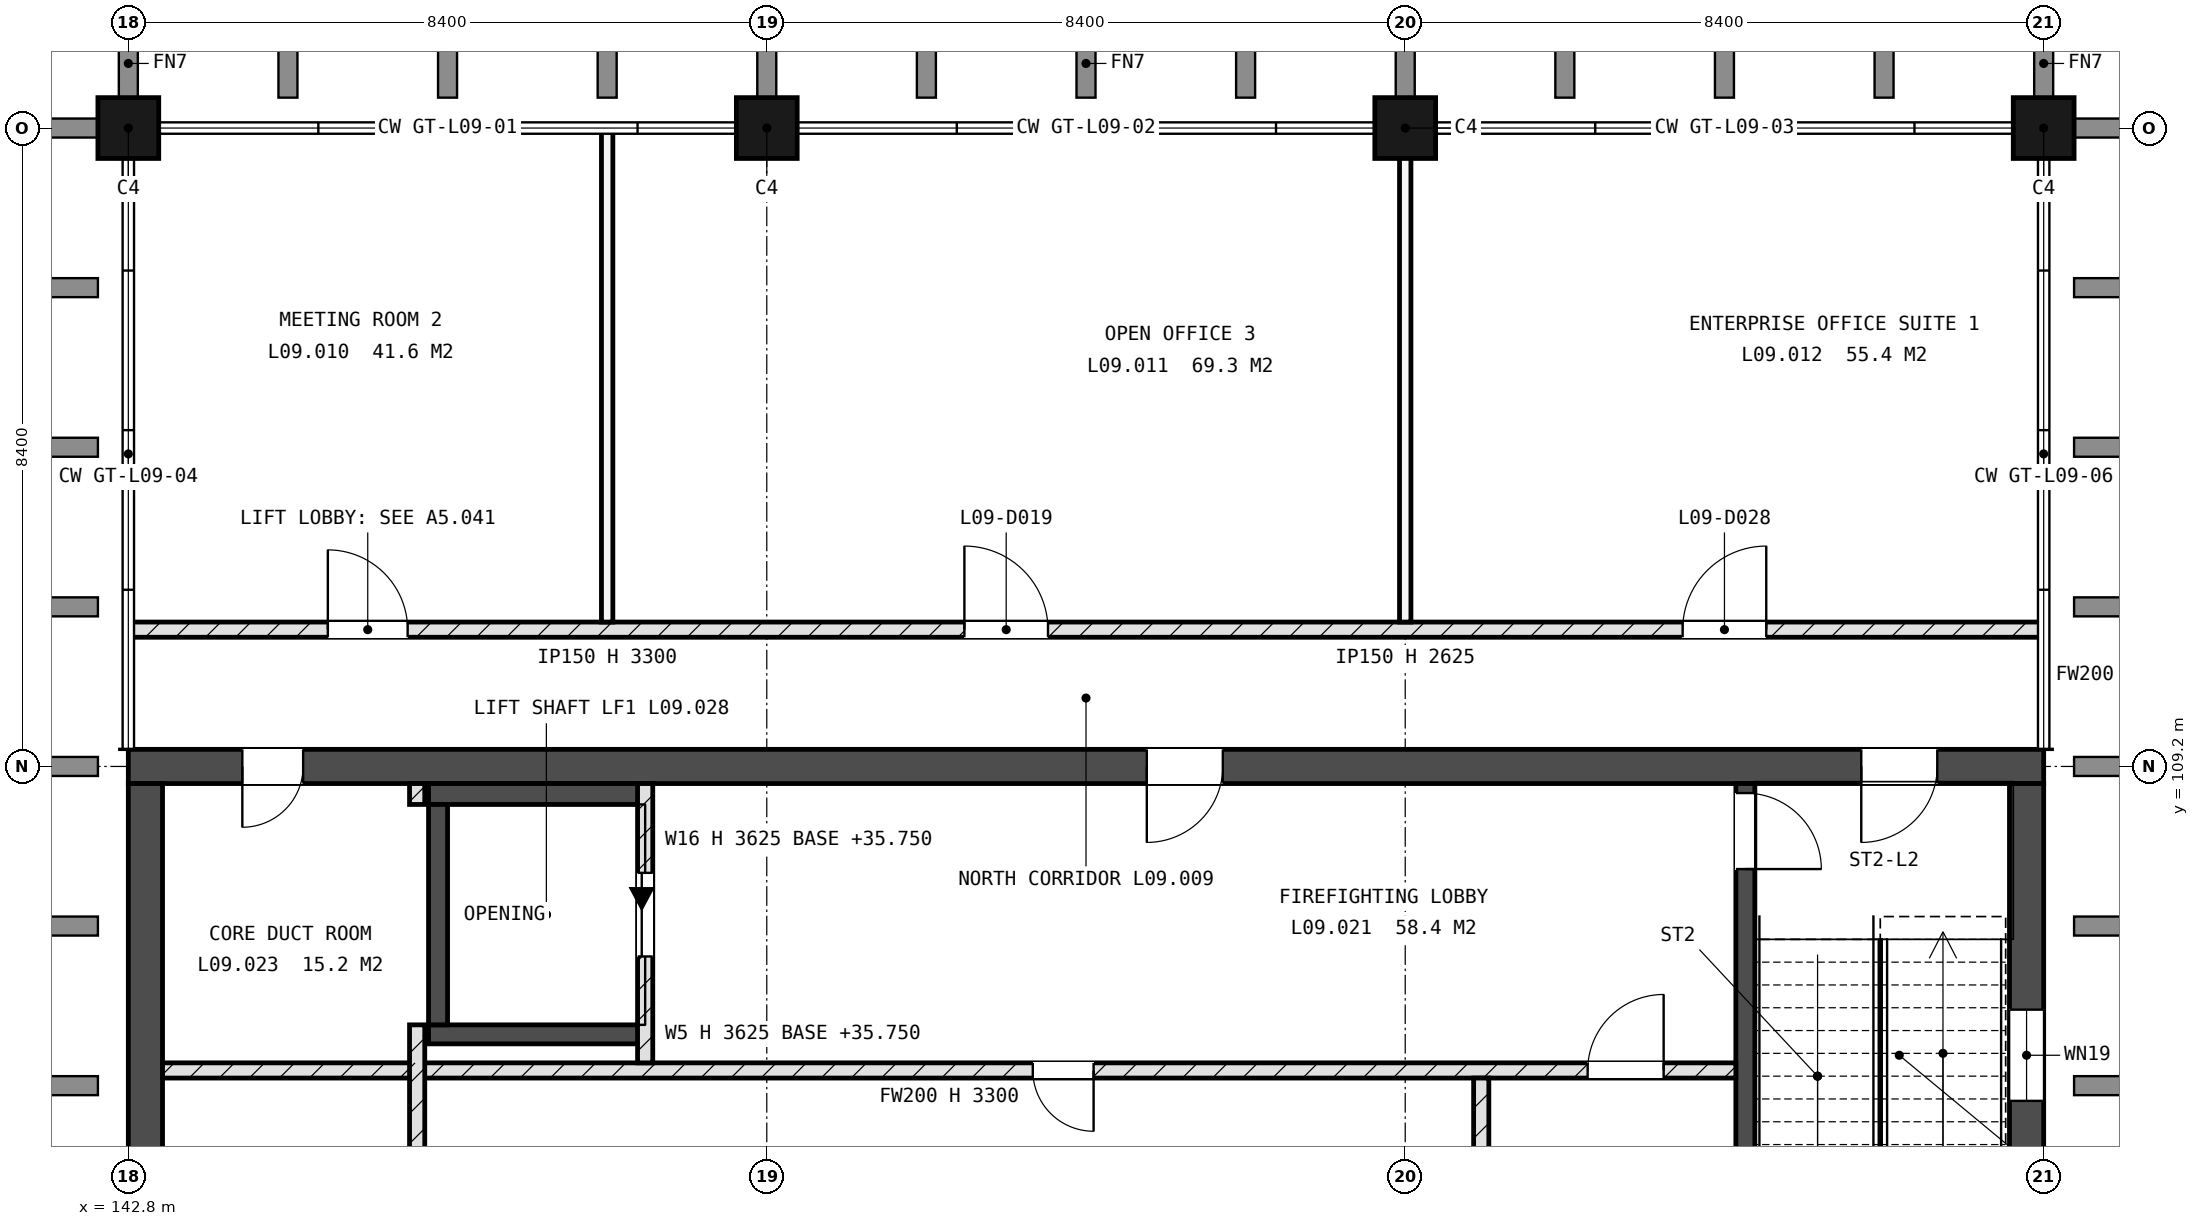
"""IFC4 building model, lengths in metres.
Left out: names, types, materials, properties, quantities, classifications, styles, units other than length and angle.
Written with IfcOpenShell. Run it as: python <this file> out.ifc"""

import sys

from ifc_helpers import new_model, si_unit, direction, frame, frame_2d, origin, origin_2d, place, context, subcontext, project, spatial, rectangle, extrude, element, fill, save


model = new_model("IFC4")
c1 = context("Model", 3, precision=1e-05, world=origin(), true_north=direction((0.0, 1.0)))
c2 = subcontext(c1, "Body", "Model", "MODEL_VIEW")
j1 = project(units=[si_unit("LENGTHUNIT", "METRE"), si_unit("PLANEANGLEUNIT", "RADIAN")], contexts=[c1])
p1 = place(None, origin())
s1 = spatial("IfcSite", under=j1, at=p1, CompositionType="ELEMENT")
p2 = place(p1, origin())
s2 = spatial("IfcBuilding", under=s1, at=p2, CompositionType="ELEMENT")
p3 = place(p2, frame((0.0, 0.0, 36.0)))
s3 = spatial("IfcBuildingStorey", under=s2, at=p3, CompositionType="ELEMENT", Elevation=36.0)
for number, where, z_axis, x_axis in (
    (1, (142.8, 117.6, -0.25), (0.0, 0.0, 1.0), (1.0, 0.0, 0.0)),
    (2, (151.2, 117.6, -0.25), (0.0, 0.0, 1.0), (1.0, 0.0, 0.0)),
    (3, (159.6, 117.6, -0.25), (0.0, 0.0, 1.0), (1.0, 0.0, 0.0)),
    (4, (168.0, 117.6, -0.25), (0.0, 0.0, 1.0), (1.0, 0.0, 0.0)),
):
    element("IfcColumn", number, at=place(p3, frame(where, z_axis=z_axis, x_axis=x_axis)), inside=s3, PredefinedType="COLUMN", context=c2, shape_type="SweptSolid", body=[
        extrude(rectangle(XDim=0.8, YDim=0.8, at=origin_2d()), origin(), (0.0, 0.0, 1.0), 3.625),
    ])
p4 = place(p3, frame((142.8, 109.2, -0.25), z_axis=(0.0, 0.0, 1.0), x_axis=(1.0, 0.0, 0.0)))
e5 = element("IfcWall", 5, at=p4, inside=s3, PredefinedType="SHEAR", context=c2, shape_type="SweptSolid", body=[
    extrude(rectangle(XDim=25.2, YDim=0.45, at=frame_2d((12.6, 0.0))), origin(), (0.0, 0.0, 1.0), 3.625),
])
p5 = place(p4, frame((22.8, 0.0, 0.25)))
e6 = element("IfcOpeningElement", 6, at=p5, cuts=e5, PredefinedType="OPENING", context=c2, shape_type="SweptSolid", body=[
    extrude(rectangle(XDim=1.0, YDim=2.1, at=frame_2d((0.5, 1.05))), frame((0.0, 0.235, 0.0), z_axis=(0.0, -1.0, 0.0), x_axis=(1.0, 0.0, 0.0)), (0.0, 0.0, 1.0), 0.47),
])
p6 = place(p4, frame((1.5, 0.0, 0.25)))
e7 = element("IfcOpeningElement", 7, at=p6, cuts=e5, PredefinedType="OPENING", context=c2, shape_type="SweptSolid", body=[
    extrude(rectangle(XDim=0.8, YDim=2.1, at=frame_2d((0.4, 1.05))), frame((0.0, 0.235, 0.0), z_axis=(0.0, -1.0, 0.0), x_axis=(1.0, 0.0, 0.0)), (0.0, 0.0, 1.0), 0.47),
])
p7 = place(p4, frame((13.4, 0.0, 0.25)))
e8 = element("IfcOpeningElement", 8, at=p7, cuts=e5, PredefinedType="OPENING", context=c2, shape_type="SweptSolid", body=[
    extrude(rectangle(XDim=1.0, YDim=2.1, at=frame_2d((0.5, 1.05))), frame((0.0, 0.235, 0.0), z_axis=(0.0, -1.0, 0.0), x_axis=(1.0, 0.0, 0.0)), (0.0, 0.0, 1.0), 0.47),
])
p8 = place(p3, frame((143.025, 92.625, -0.25), z_axis=(0.0, 0.0, 1.0), x_axis=(0.0, 1.0, 0.0)))
e9 = element("IfcWall", 9, at=p8, inside=s3, PredefinedType="SHEAR", context=c2, shape_type="SweptSolid", body=[
    extrude(rectangle(XDim=16.35, YDim=0.45, at=frame_2d((8.175, 0.0))), origin(), (0.0, 0.0, 1.0), 3.625),
])
p9 = place(p8, frame((2.975, 0.0, 1.85)))
e10 = element("IfcOpeningElement", 10, at=p9, cuts=e9, PredefinedType="OPENING", context=c2, shape_type="SweptSolid", body=[
    extrude(rectangle(XDim=1.2, YDim=0.9, at=frame_2d((0.6, 0.45))), frame((0.0, 0.235, 0.0), z_axis=(0.0, -1.0, 0.0), x_axis=(1.0, 0.0, 0.0)), (0.0, 0.0, 1.0), 0.47),
])
p10 = place(p3, frame((167.775, 92.625, -0.25), z_axis=(0.0, 0.0, 1.0), x_axis=(0.0, 1.0, 0.0)))
e11 = element("IfcWall", 11, at=p10, inside=s3, PredefinedType="SHEAR", context=c2, shape_type="SweptSolid", body=[
    extrude(rectangle(XDim=16.35, YDim=0.45, at=frame_2d((8.175, 0.0))), origin(), (0.0, 0.0, 1.0), 3.625),
])
p11 = place(p10, frame((12.175, 0.0, 1.85)))
e12 = element("IfcOpeningElement", 12, at=p11, cuts=e11, PredefinedType="OPENING", context=c2, shape_type="SweptSolid", body=[
    extrude(rectangle(XDim=1.2, YDim=0.9, at=frame_2d((0.6, 0.45))), frame((0.0, 0.235, 0.0), z_axis=(0.0, -1.0, 0.0), x_axis=(1.0, 0.0, 0.0)), (0.0, 0.0, 1.0), 0.47),
])
p12 = place(p3, frame((164.075, 101.35, -0.25), z_axis=(0.0, 0.0, 1.0), x_axis=(0.0, 1.0, 0.0)))
e13 = element("IfcWall", 13, at=p12, inside=s3, PredefinedType="SHEAR", context=c2, shape_type="SweptSolid", body=[
    extrude(rectangle(XDim=7.625, YDim=0.25, at=frame_2d((3.812, 0.0))), origin(), (0.0, 0.0, 1.0), 3.625),
])
p13 = place(p12, frame((6.5, 0.0, 0.25)))
e14 = element("IfcOpeningElement", 14, at=p13, cuts=e13, PredefinedType="OPENING", context=c2, shape_type="SweptSolid", body=[
    extrude(rectangle(XDim=1.0, YDim=2.1, at=frame_2d((0.5, 1.05))), frame((0.0, 0.135, 0.0), z_axis=(0.0, -1.0, 0.0), x_axis=(1.0, 0.0, 0.0)), (0.0, 0.0, 1.0), 0.27),
])
p14 = place(p3, frame((146.75, 105.675, -0.25), z_axis=(0.0, 0.0, 1.0), x_axis=(1.0, 0.0, 0.0)))
e15 = element("IfcWall", 15, at=p14, inside=s3, PredefinedType="SHEAR", context=c2, shape_type="SweptSolid", body=[
    extrude(rectangle(XDim=2.85, YDim=0.25, at=frame_2d((1.425, 0.0))), origin(), (0.0, 0.0, 1.0), 3.625),
])
p15 = place(p3, frame((146.75, 108.837, -0.25), z_axis=(0.0, 0.0, 1.0), x_axis=(1.0, 0.0, 0.0)))
e16 = element("IfcWall", 16, at=p15, inside=s3, PredefinedType="SHEAR", context=c2, shape_type="SweptSolid", body=[
    extrude(rectangle(XDim=2.85, YDim=0.275, at=frame_2d((1.425, 0.0))), origin(), (0.0, 0.0, 1.0), 3.625),
])
p16 = place(p3, frame((146.875, 105.8, -0.25), z_axis=(0.0, 0.0, 1.0), x_axis=(0.0, 1.0, 0.0)))
e17 = element("IfcWall", 17, at=p16, inside=s3, PredefinedType="SHEAR", context=c2, shape_type="SweptSolid", body=[
    extrude(rectangle(XDim=2.9, YDim=0.25, at=frame_2d((1.45, 0.0))), origin(), (0.0, 0.0, 1.0), 3.625),
])
p17 = place(p3, frame((143.25, 105.2, 0.0), z_axis=(0.0, 0.0, 1.0), x_axis=(1.0, 0.0, 0.0)))
e18 = element("IfcWall", 18, at=p17, inside=s3, PredefinedType="SOLIDWALL", context=c2, shape_type="SweptSolid", body=[
    extrude(rectangle(XDim=20.7, YDim=0.2, at=frame_2d((10.35, 0.0))), origin(), (0.0, 0.0, 1.0), 3.3),
])
p18 = place(p17, frame((11.45, 0.0, 0.0)))
e19 = element("IfcOpeningElement", 19, at=p18, cuts=e18, PredefinedType="OPENING", context=c2, shape_type="SweptSolid", body=[
    extrude(rectangle(XDim=0.8, YDim=2.1, at=frame_2d((0.4, 1.05))), frame((0.0, 0.11, 0.0), z_axis=(0.0, -1.0, 0.0), x_axis=(1.0, 0.0, 0.0)), (0.0, 0.0, 1.0), 0.22),
])
p19 = place(p17, frame((18.75, 0.0, 0.0)))
e20 = element("IfcOpeningElement", 20, at=p19, cuts=e18, PredefinedType="OPENING", context=c2, shape_type="SweptSolid", body=[
    extrude(rectangle(XDim=1.0, YDim=2.1, at=frame_2d((0.5, 1.05))), frame((0.0, 0.11, 0.0), z_axis=(0.0, -1.0, 0.0), x_axis=(1.0, 0.0, 0.0)), (0.0, 0.0, 1.0), 0.22),
])
p20 = place(p3, frame((142.8, 111.0, 0.0), z_axis=(0.0, 0.0, 1.0), x_axis=(1.0, 0.0, 0.0)))
e21 = element("IfcWall", 21, at=p20, inside=s3, PredefinedType="SOLIDWALL", context=c2, shape_type="SweptSolid", body=[
    extrude(rectangle(XDim=25.2, YDim=0.2, at=frame_2d((12.6, 0.0))), origin(), (0.0, 0.0, 1.0), 3.3),
])
p21 = place(p20, frame((2.625, 0.0, 0.0)))
e22 = element("IfcOpeningElement", 22, at=p21, cuts=e21, PredefinedType="OPENING", context=c2, shape_type="SweptSolid", body=[
    extrude(rectangle(XDim=1.05, YDim=2.1, at=frame_2d((0.525, 1.05))), frame((0.0, 0.11, 0.0), z_axis=(0.0, -1.0, 0.0), x_axis=(1.0, 0.0, 0.0)), (0.0, 0.0, 1.0), 0.22),
])
p22 = place(p20, frame((11.0, 0.0, 0.0)))
e23 = element("IfcOpeningElement", 23, at=p22, cuts=e21, PredefinedType="OPENING", context=c2, shape_type="SweptSolid", body=[
    extrude(rectangle(XDim=1.1, YDim=2.25, at=frame_2d((0.55, 1.125))), frame((0.0, 0.11, 0.0), z_axis=(0.0, -1.0, 0.0), x_axis=(1.0, 0.0, 0.0)), (0.0, 0.0, 1.0), 0.22),
])
p23 = place(p20, frame((20.45, 0.0, 0.0)))
e24 = element("IfcOpeningElement", 24, at=p23, cuts=e21, PredefinedType="OPENING", context=c2, shape_type="SweptSolid", body=[
    extrude(rectangle(XDim=1.1, YDim=2.25, at=frame_2d((0.55, 1.125))), frame((0.0, 0.11, 0.0), z_axis=(0.0, -1.0, 0.0), x_axis=(1.0, 0.0, 0.0)), (0.0, 0.0, 1.0), 0.22),
])
p24 = place(p3, frame((146.6, 100.5, 0.0), z_axis=(0.0, 0.0, 1.0), x_axis=(0.0, 1.0, 0.0)))
e25 = element("IfcWall", 25, at=p24, inside=s3, PredefinedType="SOLIDWALL", context=c2, shape_type="SweptSolid", body=[
    extrude(rectangle(XDim=5.3, YDim=0.2, at=frame_2d((2.65, 0.0))), origin(), (0.0, 0.0, 1.0), 3.3),
])
p25 = place(p24, frame((1.8, 0.0, 0.0)))
e26 = element("IfcOpeningElement", 26, at=p25, cuts=e25, PredefinedType="OPENING", context=c2, shape_type="SweptSolid", body=[
    extrude(rectangle(XDim=1.0, YDim=2.1, at=frame_2d((0.5, 1.05))), frame((0.0, 0.11, 0.0), z_axis=(0.0, -1.0, 0.0), x_axis=(1.0, 0.0, 0.0)), (0.0, 0.0, 1.0), 0.22),
])
p26 = place(p3, frame((146.6, 108.7, 0.0), z_axis=(0.0, 0.0, 1.0), x_axis=(0.0, 1.0, 0.0)))
e27 = element("IfcWall", 27, at=p26, inside=s3, PredefinedType="SOLIDWALL", context=c2, shape_type="SweptSolid", body=[
    extrude(rectangle(XDim=0.275, YDim=0.2, at=frame_2d((0.138, 0.0))), origin(), (0.0, 0.0, 1.0), 3.3),
])
p27 = place(p3, frame((149.1, 111.1, 0.0), z_axis=(0.0, 0.0, 1.0), x_axis=(0.0, 1.0, 0.0)))
e28 = element("IfcWall", 28, at=p27, inside=s3, PredefinedType="PARTITIONING", context=c2, shape_type="SweptSolid", body=[
    extrude(rectangle(XDim=6.5, YDim=0.15, at=frame_2d((3.25, 0.0))), origin(), (0.0, 0.0, 1.0), 3.3),
])
p28 = place(p3, frame((149.6, 105.3, 0.0), z_axis=(0.0, 0.0, 1.0), x_axis=(0.0, 1.0, 0.0)))
e29 = element("IfcWall", 29, at=p28, inside=s3, PredefinedType="SOLIDWALL", context=c2, shape_type="SweptSolid", body=[
    extrude(rectangle(XDim=3.675, YDim=0.2, at=frame_2d((1.837, 0.0))), origin(), (0.0, 0.0, 1.0), 3.3),
])
p29 = place(p28, frame((1.4, 0.0, 0.0)))
e30 = element("IfcOpeningElement", 30, at=p29, cuts=e29, PredefinedType="OPENING", context=c2, shape_type="SweptSolid", body=[
    extrude(rectangle(XDim=1.1, YDim=2.1, at=frame_2d((0.55, 1.05))), frame((0.0, 0.11, 0.0), z_axis=(0.0, -1.0, 0.0), x_axis=(1.0, 0.0, 0.0)), (0.0, 0.0, 1.0), 0.22),
])
p30 = place(p3, frame((159.6, 111.1, 0.0), z_axis=(0.0, 0.0, 1.0), x_axis=(0.0, 1.0, 0.0)))
e31 = element("IfcWall", 31, at=p30, inside=s3, PredefinedType="PARTITIONING", context=c2, shape_type="SweptSolid", body=[
    extrude(rectangle(XDim=6.5, YDim=0.15, at=frame_2d((3.25, 0.0))), origin(), (0.0, 0.0, 1.0), 2.625),
])
p31 = place(p3, frame((160.6, 92.625, 0.0), z_axis=(0.0, 0.0, 1.0), x_axis=(0.0, 1.0, 0.0)))
e32 = element("IfcWall", 32, at=p31, inside=s3, PredefinedType="SOLIDWALL", context=c2, shape_type="SweptSolid", body=[
    extrude(rectangle(XDim=12.475, YDim=0.2, at=frame_2d((6.238, 0.0))), origin(), (0.0, 0.0, 1.0), 3.3),
])
p32 = place(p31, frame((5.075, 0.0, 0.0)))
e33 = element("IfcOpeningElement", 33, at=p32, cuts=e32, PredefinedType="OPENING", context=c2, shape_type="SweptSolid", body=[
    extrude(rectangle(XDim=0.8, YDim=2.1, at=frame_2d((0.4, 1.05))), frame((0.0, 0.11, 0.0), z_axis=(0.0, -1.0, 0.0), x_axis=(1.0, 0.0, 0.0)), (0.0, 0.0, 1.0), 0.22),
])
p33 = place(p31, frame((0.775, 0.0, 0.0)))
e34 = element("IfcOpeningElement", 34, at=p33, cuts=e32, PredefinedType="OPENING", context=c2, shape_type="SweptSolid", body=[
    extrude(rectangle(XDim=1.0, YDim=2.1, at=frame_2d((0.5, 1.05))), frame((0.0, 0.11, 0.0), z_axis=(0.0, -1.0, 0.0), x_axis=(1.0, 0.0, 0.0)), (0.0, 0.0, 1.0), 0.22),
])
p34 = place(p11, origin())
e35 = element("IfcWindow", 35, at=p34, inside=s3, PartitioningType="SINGLE_PANEL", PredefinedType="WINDOW", context=c2, shape_type="SweptSolid", body=[
    extrude(rectangle(XDim=1.2, YDim=0.9, at=frame_2d((0.6, 0.45))), frame((0.0, 0.03, 0.0), z_axis=(0.0, -1.0, 0.0), x_axis=(1.0, 0.0, 0.0)), (0.0, 0.0, 1.0), 0.06),
])
fill(e12, e35)
p35 = place(p29, origin())
e36 = element("IfcDoor", 36, at=p35, inside=s3, OperationType="SLIDING_TO_LEFT", PredefinedType="DOOR", context=c2, shape_type="SweptSolid", body=[
    extrude(rectangle(XDim=1.1, YDim=2.1, at=frame_2d((0.55, 1.05))), frame((0.0, 0.025, 0.0), z_axis=(0.0, -1.0, 0.0), x_axis=(1.0, 0.0, 0.0)), (0.0, 0.0, 1.0), 0.05),
])
fill(e30, e36)
p36 = place(p13, origin())
e37 = element("IfcDoor", 37, at=p36, inside=s3, OperationType="SINGLE_SWING_LEFT", PredefinedType="DOOR", context=c2, shape_type="SweptSolid", body=[
    extrude(rectangle(XDim=1.0, YDim=2.1, at=frame_2d((0.5, 1.05))), frame((0.0, 0.025, 0.0), z_axis=(0.0, -1.0, 0.0), x_axis=(1.0, 0.0, 0.0)), (0.0, 0.0, 1.0), 0.05),
])
fill(e14, e37)
p37 = place(p5, origin())
e38 = element("IfcDoor", 38, at=p37, inside=s3, OperationType="SINGLE_SWING_LEFT", PredefinedType="DOOR", context=c2, shape_type="SweptSolid", body=[
    extrude(rectangle(XDim=1.0, YDim=2.1, at=frame_2d((0.5, 1.05))), frame((0.0, 0.025, 0.0), z_axis=(0.0, -1.0, 0.0), x_axis=(1.0, 0.0, 0.0)), (0.0, 0.0, 1.0), 0.05),
])
fill(e6, e38)
p38 = place(p21, origin())
e39 = element("IfcDoor", 39, at=p38, inside=s3, OperationType="SINGLE_SWING_RIGHT", PredefinedType="DOOR", context=c2, shape_type="SweptSolid", body=[
    extrude(rectangle(XDim=1.05, YDim=2.1, at=frame_2d((0.525, 1.05))), frame((0.0, 0.025, 0.0), z_axis=(0.0, -1.0, 0.0), x_axis=(1.0, 0.0, 0.0)), (0.0, 0.0, 1.0), 0.05),
])
fill(e22, e39)
p39 = place(p22, origin())
e40 = element("IfcDoor", 40, at=p39, inside=s3, OperationType="SINGLE_SWING_RIGHT", PredefinedType="DOOR", context=c2, shape_type="SweptSolid", body=[
    extrude(rectangle(XDim=1.1, YDim=2.25, at=frame_2d((0.55, 1.125))), frame((0.0, 0.025, 0.0), z_axis=(0.0, -1.0, 0.0), x_axis=(1.0, 0.0, 0.0)), (0.0, 0.0, 1.0), 0.05),
])
fill(e23, e40)
p40 = place(p23, origin())
e41 = element("IfcDoor", 41, at=p40, inside=s3, OperationType="SINGLE_SWING_LEFT", PredefinedType="DOOR", context=c2, shape_type="SweptSolid", body=[
    extrude(rectangle(XDim=1.1, YDim=2.25, at=frame_2d((0.55, 1.125))), frame((0.0, 0.025, 0.0), z_axis=(0.0, -1.0, 0.0), x_axis=(1.0, 0.0, 0.0)), (0.0, 0.0, 1.0), 0.05),
])
fill(e24, e41)
p41 = place(p18, origin())
e42 = element("IfcDoor", 42, at=p41, inside=s3, OperationType="SINGLE_SWING_RIGHT", PredefinedType="DOOR", context=c2, shape_type="SweptSolid", body=[
    extrude(rectangle(XDim=0.8, YDim=2.1, at=frame_2d((0.4, 1.05))), frame((0.0, 0.025, 0.0), z_axis=(0.0, -1.0, 0.0), x_axis=(1.0, 0.0, 0.0)), (0.0, 0.0, 1.0), 0.05),
])
fill(e19, e42)
p42 = place(p6, origin())
e43 = element("IfcDoor", 43, at=p42, inside=s3, OperationType="SINGLE_SWING_LEFT", PredefinedType="DOOR", context=c2, shape_type="SweptSolid", body=[
    extrude(rectangle(XDim=0.8, YDim=2.1, at=frame_2d((0.4, 1.05))), frame((0.0, 0.025, 0.0), z_axis=(0.0, -1.0, 0.0), x_axis=(1.0, 0.0, 0.0)), (0.0, 0.0, 1.0), 0.05),
])
fill(e7, e43)
p43 = place(p7, origin())
e44 = element("IfcDoor", 44, at=p43, inside=s3, OperationType="SINGLE_SWING_LEFT", PredefinedType="DOOR", context=c2, shape_type="SweptSolid", body=[
    extrude(rectangle(XDim=1.0, YDim=2.1, at=frame_2d((0.5, 1.05))), frame((0.0, 0.025, 0.0), z_axis=(0.0, -1.0, 0.0), x_axis=(1.0, 0.0, 0.0)), (0.0, 0.0, 1.0), 0.05),
])
fill(e8, e44)
p44 = place(p19, origin())
e45 = element("IfcDoor", 45, at=p44, inside=s3, OperationType="SINGLE_SWING_LEFT", PredefinedType="DOOR", context=c2, shape_type="SweptSolid", body=[
    extrude(rectangle(XDim=1.0, YDim=2.1, at=frame_2d((0.5, 1.05))), frame((0.0, 0.025, 0.0), z_axis=(0.0, -1.0, 0.0), x_axis=(1.0, 0.0, 0.0)), (0.0, 0.0, 1.0), 0.05),
])
fill(e20, e45)
save(model, sys.argv[1])
